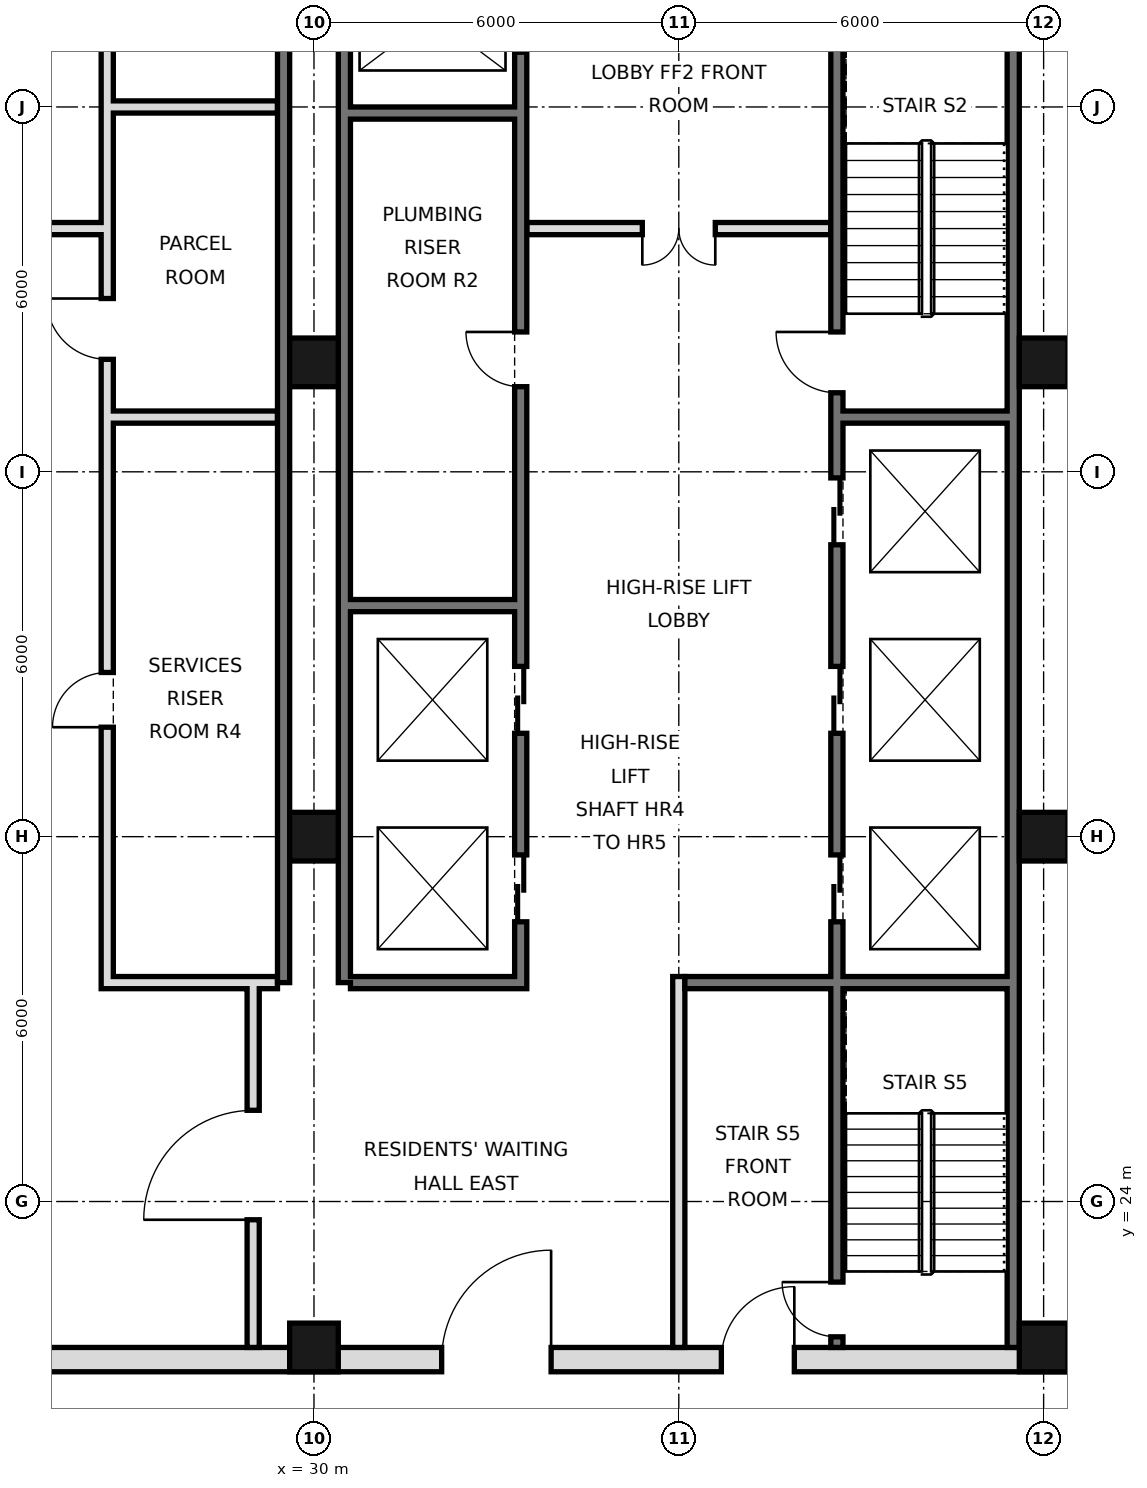
"""IFC4 building model, lengths in metres.
Left out: names, types, materials, properties, quantities, classifications, styles, units other than length and angle.
Written with IfcOpenShell. Run it as: python <this file> out.ifc"""

import sys

from ifc_helpers import new_model, si_unit, direction, frame, frame_2d, origin, origin_2d, place, context, subcontext, project, spatial, rectangle, hollow_rectangle, extrude, element, fill, save


model = new_model("IFC4")
c1 = context("Model", 3, precision=1e-05, world=origin(), true_north=direction((0.0, 1.0)))
c2 = subcontext(c1, "Body", "Model", "MODEL_VIEW")
j1 = project(units=[si_unit("LENGTHUNIT", "METRE"), si_unit("PLANEANGLEUNIT", "RADIAN")], contexts=[c1])
p1 = place(None, origin())
s1 = spatial("IfcSite", under=j1, at=p1, CompositionType="ELEMENT")
p2 = place(p1, origin())
s2 = spatial("IfcBuilding", under=s1, at=p2, CompositionType="ELEMENT")
p3 = place(p2, frame((0.0, 0.0, 239.6)))
s3 = spatial("IfcBuildingStorey", under=s2, at=p3, CompositionType="ELEMENT", Elevation=239.6)
for number, where, z_axis, x_axis in (
    (1, (30.0, 21.6, 0.0), (0.0, 0.0, 1.0), (1.0, 0.0, 0.0)),
    (2, (30.0, 30.0, 0.0), (0.0, 0.0, 1.0), (1.0, 0.0, 0.0)),
    (3, (30.0, 37.8, 0.0), (0.0, 0.0, 1.0), (1.0, 0.0, 0.0)),
    (4, (42.0, 21.6, 0.0), (0.0, 0.0, 1.0), (1.0, 0.0, 0.0)),
    (5, (42.0, 30.0, 0.0), (0.0, 0.0, 1.0), (1.0, 0.0, 0.0)),
    (6, (42.0, 37.8, 0.0), (0.0, 0.0, 1.0), (1.0, 0.0, 0.0)),
):
    element("IfcColumn", number, at=place(p3, frame(where, z_axis=z_axis, x_axis=x_axis)), inside=s3, PredefinedType="COLUMN", context=c2, shape_type="SweptSolid", body=[
        extrude(hollow_rectangle(XDim=0.8, YDim=0.8, WallThickness=0.04, at=origin_2d()), origin(), (0.0, 0.0, 1.0), 3.6),
    ])
p4 = place(p3, frame((41.5, 21.6, 0.0), z_axis=(0.0, 0.0, 1.0), x_axis=(0.0, 1.0, 0.0)))
e7 = element("IfcWall", 7, at=p4, inside=s3, PredefinedType="SOLIDWALL", context=c2, shape_type="SweptSolid", body=[
    extrude(rectangle(XDim=23.5, YDim=0.2, at=frame_2d((11.75, 0.0))), origin(), (0.0, 0.0, 1.0), 3.42),
])
for number, where, z_axis, x_axis in (
    (8, (29.5, 27.6, 0.0), (0.0, 0.0, 1.0), (0.0, 1.0, 0.0)),
    (9, (30.5, 27.6, 0.0), (0.0, 0.0, 1.0), (0.0, 1.0, 0.0)),
):
    element("IfcWall", number, at=place(p3, frame(where, z_axis=z_axis, x_axis=x_axis)), inside=s3, PredefinedType="SOLIDWALL", context=c2, shape_type="SweptSolid", body=[
        extrude(rectangle(XDim=17.5, YDim=0.2, at=frame_2d((8.75, 0.0))), origin(), (0.0, 0.0, 1.0), 3.42),
    ])
p5 = place(p3, frame((5.6, 21.4, 0.0), z_axis=(0.0, 0.0, 1.0), x_axis=(1.0, 0.0, 0.0)))
e10 = element("IfcWall", 10, at=p5, inside=s3, PredefinedType="SOLIDWALL", context=c2, shape_type="SweptSolid", body=[
    extrude(rectangle(XDim=36.8, YDim=0.4, at=frame_2d((18.4, 0.0))), origin(), (0.0, 0.0, 1.0), 3.42),
])
p6 = place(p5, frame((8.5, 0.0, 0.0)))
e11 = element("IfcOpeningElement", 11, at=p6, cuts=e10, PredefinedType="OPENING", context=c2, shape_type="SweptSolid", body=[
    extrude(rectangle(XDim=1.8, YDim=2.1, at=frame_2d((0.9, 1.05))), frame((0.0, 0.21, 0.0), z_axis=(0.0, -1.0, 0.0), x_axis=(1.0, 0.0, 0.0)), (0.0, 0.0, 1.0), 0.42),
])
p7 = place(p5, frame((17.5, 0.0, 0.0)))
e12 = element("IfcOpeningElement", 12, at=p7, cuts=e10, PredefinedType="OPENING", context=c2, shape_type="SweptSolid", body=[
    extrude(rectangle(XDim=1.8, YDim=2.1, at=frame_2d((0.9, 1.05))), frame((0.0, 0.21, 0.0), z_axis=(0.0, -1.0, 0.0), x_axis=(1.0, 0.0, 0.0)), (0.0, 0.0, 1.0), 0.42),
])
p8 = place(p5, frame((26.5, 0.0, 0.0)))
e13 = element("IfcOpeningElement", 13, at=p8, cuts=e10, PredefinedType="OPENING", context=c2, shape_type="SweptSolid", body=[
    extrude(rectangle(XDim=1.8, YDim=2.1, at=frame_2d((0.9, 1.05))), frame((0.0, 0.21, 0.0), z_axis=(0.0, -1.0, 0.0), x_axis=(1.0, 0.0, 0.0)), (0.0, 0.0, 1.0), 0.42),
])
p9 = place(p5, frame((4.5, 0.0, 0.0)))
e14 = element("IfcOpeningElement", 14, at=p9, cuts=e10, PredefinedType="OPENING", context=c2, shape_type="SweptSolid", body=[
    extrude(rectangle(XDim=1.2, YDim=2.1, at=frame_2d((0.6, 1.05))), frame((0.0, 0.21, 0.0), z_axis=(0.0, -1.0, 0.0), x_axis=(1.0, 0.0, 0.0)), (0.0, 0.0, 1.0), 0.42),
])
p10 = place(p5, frame((31.1, 0.0, 0.0)))
e15 = element("IfcOpeningElement", 15, at=p10, cuts=e10, PredefinedType="OPENING", context=c2, shape_type="SweptSolid", body=[
    extrude(rectangle(XDim=1.2, YDim=2.1, at=frame_2d((0.6, 1.05))), frame((0.0, 0.21, 0.0), z_axis=(0.0, -1.0, 0.0), x_axis=(1.0, 0.0, 0.0)), (0.0, 0.0, 1.0), 0.42),
])
p11 = place(p3, frame((29.0, 21.6, 0.0), z_axis=(0.0, 0.0, 1.0), x_axis=(0.0, 1.0, 0.0)))
e16 = element("IfcWall", 16, at=p11, inside=s3, PredefinedType="PARTITIONING", context=c2, shape_type="SweptSolid", body=[
    extrude(rectangle(XDim=6.0, YDim=0.2, at=frame_2d((3.0, 0.0))), origin(), (0.0, 0.0, 1.0), 3.42),
])
p12 = place(p11, frame((2.1, 0.0, 0.0)))
e17 = element("IfcOpeningElement", 17, at=p12, cuts=e16, PredefinedType="OPENING", context=c2, shape_type="SweptSolid", body=[
    extrude(rectangle(XDim=1.8, YDim=2.1, at=frame_2d((0.9, 1.05))), frame((0.0, 0.11, 0.0), z_axis=(0.0, -1.0, 0.0), x_axis=(1.0, 0.0, 0.0)), (0.0, 0.0, 1.0), 0.22),
])
p13 = place(p3, frame((26.6, 27.5, 0.0), z_axis=(0.0, 0.0, 1.0), x_axis=(0.0, 1.0, 0.0)))
e18 = element("IfcWall", 18, at=p13, inside=s3, PredefinedType="SOLIDWALL", context=c2, shape_type="SweptSolid", body=[
    extrude(rectangle(XDim=17.5, YDim=0.2, at=frame_2d((8.75, 0.0))), origin(), (0.0, 0.0, 1.0), 3.42),
])
p14 = place(p13, frame((4.3, 0.0, 0.0)))
e19 = element("IfcOpeningElement", 19, at=p14, cuts=e18, PredefinedType="OPENING", context=c2, shape_type="SweptSolid", body=[
    extrude(rectangle(XDim=0.9, YDim=2.1, at=frame_2d((0.45, 1.05))), frame((0.0, 0.11, 0.0), z_axis=(0.0, -1.0, 0.0), x_axis=(1.0, 0.0, 0.0)), (0.0, 0.0, 1.0), 0.22),
])
p15 = place(p13, frame((10.35, 0.0, 0.0)))
e20 = element("IfcOpeningElement", 20, at=p15, cuts=e18, PredefinedType="OPENING", context=c2, shape_type="SweptSolid", body=[
    extrude(rectangle(XDim=1.0, YDim=2.1, at=frame_2d((0.5, 1.05))), frame((0.0, 0.11, 0.0), z_axis=(0.0, -1.0, 0.0), x_axis=(1.0, 0.0, 0.0)), (0.0, 0.0, 1.0), 0.22),
])
p16 = place(p13, frame((15.475, 0.0, 0.0)))
e21 = element("IfcOpeningElement", 21, at=p16, cuts=e18, PredefinedType="OPENING", context=c2, shape_type="SweptSolid", body=[
    extrude(rectangle(XDim=1.0, YDim=2.1, at=frame_2d((0.5, 1.05))), frame((0.0, 0.11, 0.0), z_axis=(0.0, -1.0, 0.0), x_axis=(1.0, 0.0, 0.0)), (0.0, 0.0, 1.0), 0.22),
])
p17 = place(p3, frame((33.4, 27.5, 0.0), z_axis=(0.0, 0.0, 1.0), x_axis=(0.0, 1.0, 0.0)))
e22 = element("IfcWall", 22, at=p17, inside=s3, PredefinedType="SOLIDWALL", context=c2, shape_type="SweptSolid", body=[
    extrude(rectangle(XDim=17.5, YDim=0.2, at=frame_2d((8.75, 0.0))), origin(), (0.0, 0.0, 1.0), 3.42),
])
p18 = place(p17, frame((1.1, 0.0, 0.0)))
e23 = element("IfcOpeningElement", 23, at=p18, cuts=e22, PredefinedType="OPENING", context=c2, shape_type="SweptSolid", body=[
    extrude(rectangle(XDim=1.1, YDim=2.1, at=frame_2d((0.55, 1.05))), frame((0.0, 0.11, 0.0), z_axis=(0.0, -1.0, 0.0), x_axis=(1.0, 0.0, 0.0)), (0.0, 0.0, 1.0), 0.22),
])
p19 = place(p17, frame((4.2, 0.0, 0.0)))
e24 = element("IfcOpeningElement", 24, at=p19, cuts=e22, PredefinedType="OPENING", context=c2, shape_type="SweptSolid", body=[
    extrude(rectangle(XDim=1.1, YDim=2.1, at=frame_2d((0.55, 1.05))), frame((0.0, 0.11, 0.0), z_axis=(0.0, -1.0, 0.0), x_axis=(1.0, 0.0, 0.0)), (0.0, 0.0, 1.0), 0.22),
])
p20 = place(p17, frame((15.4, 0.0, 0.0)))
e25 = element("IfcOpeningElement", 25, at=p20, cuts=e22, PredefinedType="OPENING", context=c2, shape_type="SweptSolid", body=[
    extrude(rectangle(XDim=1.1, YDim=2.1, at=frame_2d((0.55, 1.05))), frame((0.0, 0.11, 0.0), z_axis=(0.0, -1.0, 0.0), x_axis=(1.0, 0.0, 0.0)), (0.0, 0.0, 1.0), 0.22),
])
p21 = place(p17, frame((9.9, 0.0, 0.0)))
e26 = element("IfcOpeningElement", 26, at=p21, cuts=e22, PredefinedType="OPENING", context=c2, shape_type="SweptSolid", body=[
    extrude(rectangle(XDim=0.9, YDim=2.1, at=frame_2d((0.45, 1.05))), frame((0.0, 0.11, 0.0), z_axis=(0.0, -1.0, 0.0), x_axis=(1.0, 0.0, 0.0)), (0.0, 0.0, 1.0), 0.22),
])
p22 = place(p3, frame((36.0, 21.6, 0.0), z_axis=(0.0, 0.0, 1.0), x_axis=(0.0, 1.0, 0.0)))
e27 = element("IfcWall", 27, at=p22, inside=s3, PredefinedType="PARTITIONING", context=c2, shape_type="SweptSolid", body=[
    extrude(rectangle(XDim=6.1, YDim=0.2, at=frame_2d((3.05, 0.0))), origin(), (0.0, 0.0, 1.0), 3.42),
])
p23 = place(p3, frame((38.6, 21.6, 0.0), z_axis=(0.0, 0.0, 1.0), x_axis=(0.0, 1.0, 0.0)))
e28 = element("IfcWall", 28, at=p23, inside=s3, PredefinedType="SOLIDWALL", context=c2, shape_type="SweptSolid", body=[
    extrude(rectangle(XDim=23.4, YDim=0.2, at=frame_2d((11.7, 0.0))), origin(), (0.0, 0.0, 1.0), 3.42),
])
p24 = place(p23, frame((7.0, 0.0, 0.0)))
e29 = element("IfcOpeningElement", 29, at=p24, cuts=e28, PredefinedType="OPENING", context=c2, shape_type="SweptSolid", body=[
    extrude(rectangle(XDim=1.1, YDim=2.1, at=frame_2d((0.55, 1.05))), frame((0.0, 0.11, 0.0), z_axis=(0.0, -1.0, 0.0), x_axis=(1.0, 0.0, 0.0)), (0.0, 0.0, 1.0), 0.22),
])
p25 = place(p23, frame((10.1, 0.0, 0.0)))
e30 = element("IfcOpeningElement", 30, at=p25, cuts=e28, PredefinedType="OPENING", context=c2, shape_type="SweptSolid", body=[
    extrude(rectangle(XDim=1.1, YDim=2.1, at=frame_2d((0.55, 1.05))), frame((0.0, 0.11, 0.0), z_axis=(0.0, -1.0, 0.0), x_axis=(1.0, 0.0, 0.0)), (0.0, 0.0, 1.0), 0.22),
])
p26 = place(p23, frame((13.2, 0.0, 0.0)))
e31 = element("IfcOpeningElement", 31, at=p26, cuts=e28, PredefinedType="OPENING", context=c2, shape_type="SweptSolid", body=[
    extrude(rectangle(XDim=1.1, YDim=2.1, at=frame_2d((0.55, 1.05))), frame((0.0, 0.11, 0.0), z_axis=(0.0, -1.0, 0.0), x_axis=(1.0, 0.0, 0.0)), (0.0, 0.0, 1.0), 0.22),
])
p27 = place(p23, frame((15.7, 0.0, 0.0)))
e32 = element("IfcOpeningElement", 32, at=p27, cuts=e28, PredefinedType="OPENING", context=c2, shape_type="SweptSolid", body=[
    extrude(rectangle(XDim=1.0, YDim=2.1, at=frame_2d((0.5, 1.05))), frame((0.0, 0.11, 0.0), z_axis=(0.0, -1.0, 0.0), x_axis=(1.0, 0.0, 0.0)), (0.0, 0.0, 1.0), 0.22),
])
p28 = place(p23, frame((0.175, 0.0, 0.0)))
e33 = element("IfcOpeningElement", 33, at=p28, cuts=e28, PredefinedType="OPENING", context=c2, shape_type="SweptSolid", body=[
    extrude(rectangle(XDim=0.9, YDim=2.1, at=frame_2d((0.45, 1.05))), frame((0.0, 0.11, 0.0), z_axis=(0.0, -1.0, 0.0), x_axis=(1.0, 0.0, 0.0)), (0.0, 0.0, 1.0), 0.22),
])
for number, where, z_axis, x_axis in (
    (34, (26.7, 27.6, 0.0), (0.0, 0.0, 1.0), (1.0, 0.0, 0.0)),
    (35, (30.6, 27.6, 0.0), (0.0, 0.0, 1.0), (1.0, 0.0, 0.0)),
):
    element("IfcWall", number, at=place(p3, frame(where, z_axis=z_axis, x_axis=x_axis)), inside=s3, PredefinedType="SOLIDWALL", context=c2, shape_type="SweptSolid", body=[
        extrude(rectangle(XDim=2.7, YDim=0.2, at=frame_2d((1.35, 0.0))), origin(), (0.0, 0.0, 1.0), 3.42),
    ])
p29 = place(p3, frame((36.1, 27.6, 0.0), z_axis=(0.0, 0.0, 1.0), x_axis=(1.0, 0.0, 0.0)))
e36 = element("IfcWall", 36, at=p29, inside=s3, PredefinedType="SOLIDWALL", context=c2, shape_type="SweptSolid", body=[
    extrude(rectangle(XDim=5.3, YDim=0.2, at=frame_2d((2.65, 0.0))), origin(), (0.0, 0.0, 1.0), 3.42),
])
for number, where, z_axis, x_axis in (
    (37, (30.6, 33.8, 0.0), (0.0, 0.0, 1.0), (1.0, 0.0, 0.0)),
    (38, (26.7, 36.9, 0.0), (0.0, 0.0, 1.0), (1.0, 0.0, 0.0)),
    (39, (38.7, 36.9, 0.0), (0.0, 0.0, 1.0), (1.0, 0.0, 0.0)),
):
    element("IfcWall", number, at=place(p3, frame(where, z_axis=z_axis, x_axis=x_axis)), inside=s3, PredefinedType="SOLIDWALL", context=c2, shape_type="SweptSolid", body=[
        extrude(rectangle(XDim=2.7, YDim=0.2, at=frame_2d((1.35, 0.0))), origin(), (0.0, 0.0, 1.0), 3.42),
    ])
p30 = place(p3, frame((21.5, 40.0, 0.0), z_axis=(0.0, 0.0, 1.0), x_axis=(1.0, 0.0, 0.0)))
e40 = element("IfcWall", 40, at=p30, inside=s3, PredefinedType="PARTITIONING", context=c2, shape_type="SweptSolid", body=[
    extrude(rectangle(XDim=5.0, YDim=0.2, at=frame_2d((2.5, 0.0))), origin(), (0.0, 0.0, 1.0), 3.42),
])
p31 = place(p30, frame((1.9, 0.0, 0.0)))
e41 = element("IfcOpeningElement", 41, at=p31, cuts=e40, PredefinedType="OPENING", context=c2, shape_type="SweptSolid", body=[
    extrude(rectangle(XDim=1.2, YDim=2.1, at=frame_2d((0.6, 1.05))), frame((0.0, 0.11, 0.0), z_axis=(0.0, -1.0, 0.0), x_axis=(1.0, 0.0, 0.0)), (0.0, 0.0, 1.0), 0.22),
])
p32 = place(p3, frame((33.5, 40.0, 0.0), z_axis=(0.0, 0.0, 1.0), x_axis=(1.0, 0.0, 0.0)))
e42 = element("IfcWall", 42, at=p32, inside=s3, PredefinedType="PARTITIONING", context=c2, shape_type="SweptSolid", body=[
    extrude(rectangle(XDim=5.0, YDim=0.2, at=frame_2d((2.5, 0.0))), origin(), (0.0, 0.0, 1.0), 3.42),
])
p33 = place(p32, frame((1.9, 0.0, 0.0)))
e43 = element("IfcOpeningElement", 43, at=p33, cuts=e42, PredefinedType="OPENING", context=c2, shape_type="SweptSolid", body=[
    extrude(rectangle(XDim=1.2, YDim=2.1, at=frame_2d((0.6, 1.05))), frame((0.0, 0.11, 0.0), z_axis=(0.0, -1.0, 0.0), x_axis=(1.0, 0.0, 0.0)), (0.0, 0.0, 1.0), 0.22),
])
p34 = place(p3, frame((30.6, 41.9, 0.0), z_axis=(0.0, 0.0, 1.0), x_axis=(1.0, 0.0, 0.0)))
e44 = element("IfcWall", 44, at=p34, inside=s3, PredefinedType="SOLIDWALL", context=c2, shape_type="SweptSolid", body=[
    extrude(rectangle(XDim=2.7, YDim=0.2, at=frame_2d((1.35, 0.0))), origin(), (0.0, 0.0, 1.0), 3.42),
])
p35 = place(p3, frame((26.7, 42.0, 0.0), z_axis=(0.0, 0.0, 1.0), x_axis=(1.0, 0.0, 0.0)))
e45 = element("IfcWall", 45, at=p35, inside=s3, PredefinedType="PARTITIONING", context=c2, shape_type="SweptSolid", body=[
    extrude(rectangle(XDim=2.7, YDim=0.2, at=frame_2d((1.35, 0.0))), origin(), (0.0, 0.0, 1.0), 3.42),
])
p36 = place(p12, origin())
e46 = element("IfcDoor", 46, at=p36, inside=s3, OperationType="SINGLE_SWING_LEFT", PredefinedType="DOOR", context=c2, shape_type="SweptSolid", body=[
    extrude(rectangle(XDim=1.8, YDim=2.1, at=frame_2d((0.9, 1.05))), frame((0.0, 0.025, 0.0), z_axis=(0.0, -1.0, 0.0), x_axis=(1.0, 0.0, 0.0)), (0.0, 0.0, 1.0), 0.05),
])
fill(e17, e46)
p37 = place(p8, frame((1.8, 0.0, 0.0), z_axis=(0.0, 0.0, 1.0), x_axis=(-1.0, 0.0, 0.0)))
e47 = element("IfcDoor", 47, at=p37, inside=s3, OperationType="SINGLE_SWING_LEFT", PredefinedType="DOOR", context=c2, shape_type="SweptSolid", body=[
    extrude(rectangle(XDim=1.8, YDim=2.1, at=frame_2d((0.9, 1.05))), frame((0.0, 0.025, 0.0), z_axis=(0.0, -1.0, 0.0), x_axis=(1.0, 0.0, 0.0)), (0.0, 0.0, 1.0), 0.05),
])
fill(e13, e47)
p38 = place(p10, frame((1.2, 0.0, 0.0), z_axis=(0.0, 0.0, 1.0), x_axis=(-1.0, 0.0, 0.0)))
e48 = element("IfcDoor", 48, at=p38, inside=s3, OperationType="SINGLE_SWING_LEFT", PredefinedType="DOOR", context=c2, shape_type="SweptSolid", body=[
    extrude(rectangle(XDim=1.2, YDim=2.1, at=frame_2d((0.6, 1.05))), frame((0.0, 0.025, 0.0), z_axis=(0.0, -1.0, 0.0), x_axis=(1.0, 0.0, 0.0)), (0.0, 0.0, 1.0), 0.05),
])
fill(e15, e48)
p39 = place(p33, frame((1.2, 0.0, 0.0), z_axis=(0.0, 0.0, 1.0), x_axis=(-1.0, 0.0, 0.0)))
e49 = element("IfcDoor", 49, at=p39, inside=s3, OperationType="DOUBLE_DOOR_SINGLE_SWING", PredefinedType="DOOR", context=c2, shape_type="SweptSolid", body=[
    extrude(rectangle(XDim=1.2, YDim=2.1, at=frame_2d((0.6, 1.05))), frame((0.0, 0.025, 0.0), z_axis=(0.0, -1.0, 0.0), x_axis=(1.0, 0.0, 0.0)), (0.0, 0.0, 1.0), 0.05),
])
fill(e43, e49)
p40 = place(p24, origin())
e50 = element("IfcDoor", 50, at=p40, inside=s3, OperationType="DOUBLE_DOOR_SLIDING", PredefinedType="DOOR", context=c2, shape_type="SweptSolid", body=[
    extrude(rectangle(XDim=1.1, YDim=2.1, at=frame_2d((0.55, 1.05))), frame((0.0, 0.025, 0.0), z_axis=(0.0, -1.0, 0.0), x_axis=(1.0, 0.0, 0.0)), (0.0, 0.0, 1.0), 0.05),
])
fill(e29, e50)
p41 = place(p25, origin())
e51 = element("IfcDoor", 51, at=p41, inside=s3, OperationType="DOUBLE_DOOR_SLIDING", PredefinedType="DOOR", context=c2, shape_type="SweptSolid", body=[
    extrude(rectangle(XDim=1.1, YDim=2.1, at=frame_2d((0.55, 1.05))), frame((0.0, 0.025, 0.0), z_axis=(0.0, -1.0, 0.0), x_axis=(1.0, 0.0, 0.0)), (0.0, 0.0, 1.0), 0.05),
])
fill(e30, e51)
p42 = place(p26, origin())
e52 = element("IfcDoor", 52, at=p42, inside=s3, OperationType="DOUBLE_DOOR_SLIDING", PredefinedType="DOOR", context=c2, shape_type="SweptSolid", body=[
    extrude(rectangle(XDim=1.1, YDim=2.1, at=frame_2d((0.55, 1.05))), frame((0.0, 0.025, 0.0), z_axis=(0.0, -1.0, 0.0), x_axis=(1.0, 0.0, 0.0)), (0.0, 0.0, 1.0), 0.05),
])
fill(e31, e52)
p43 = place(p18, origin())
e53 = element("IfcDoor", 53, at=p43, inside=s3, OperationType="DOUBLE_DOOR_SLIDING", PredefinedType="DOOR", context=c2, shape_type="SweptSolid", body=[
    extrude(rectangle(XDim=1.1, YDim=2.1, at=frame_2d((0.55, 1.05))), frame((0.0, 0.025, 0.0), z_axis=(0.0, -1.0, 0.0), x_axis=(1.0, 0.0, 0.0)), (0.0, 0.0, 1.0), 0.05),
])
fill(e23, e53)
p44 = place(p19, origin())
e54 = element("IfcDoor", 54, at=p44, inside=s3, OperationType="DOUBLE_DOOR_SLIDING", PredefinedType="DOOR", context=c2, shape_type="SweptSolid", body=[
    extrude(rectangle(XDim=1.1, YDim=2.1, at=frame_2d((0.55, 1.05))), frame((0.0, 0.025, 0.0), z_axis=(0.0, -1.0, 0.0), x_axis=(1.0, 0.0, 0.0)), (0.0, 0.0, 1.0), 0.05),
])
fill(e24, e54)
p45 = place(p27, frame((1.0, 0.0, 0.0), z_axis=(0.0, 0.0, 1.0), x_axis=(-1.0, 0.0, 0.0)))
e55 = element("IfcDoor", 55, at=p45, inside=s3, OperationType="SINGLE_SWING_LEFT", PredefinedType="DOOR", context=c2, shape_type="SweptSolid", body=[
    extrude(rectangle(XDim=1.0, YDim=2.1, at=frame_2d((0.5, 1.05))), frame((0.0, 0.025, 0.0), z_axis=(0.0, -1.0, 0.0), x_axis=(1.0, 0.0, 0.0)), (0.0, 0.0, 1.0), 0.05),
])
fill(e32, e55)
p46 = place(p28, frame((0.9, 0.0, 0.0), z_axis=(0.0, 0.0, 1.0), x_axis=(-1.0, 0.0, 0.0)))
e56 = element("IfcDoor", 56, at=p46, inside=s3, OperationType="SINGLE_SWING_LEFT", PredefinedType="DOOR", context=c2, shape_type="SweptSolid", body=[
    extrude(rectangle(XDim=0.9, YDim=2.1, at=frame_2d((0.45, 1.05))), frame((0.0, 0.025, 0.0), z_axis=(0.0, -1.0, 0.0), x_axis=(1.0, 0.0, 0.0)), (0.0, 0.0, 1.0), 0.05),
])
fill(e33, e56)
p47 = place(p21, frame((0.9, 0.0, 0.0), z_axis=(0.0, 0.0, 1.0), x_axis=(-1.0, 0.0, 0.0)))
e57 = element("IfcDoor", 57, at=p47, inside=s3, OperationType="SINGLE_SWING_LEFT", PredefinedType="DOOR", context=c2, shape_type="SweptSolid", body=[
    extrude(rectangle(XDim=0.9, YDim=2.1, at=frame_2d((0.45, 1.05))), frame((0.0, 0.025, 0.0), z_axis=(0.0, -1.0, 0.0), x_axis=(1.0, 0.0, 0.0)), (0.0, 0.0, 1.0), 0.05),
])
fill(e26, e57)
p48 = place(p14, origin())
e58 = element("IfcDoor", 58, at=p48, inside=s3, OperationType="SINGLE_SWING_LEFT", PredefinedType="DOOR", context=c2, shape_type="SweptSolid", body=[
    extrude(rectangle(XDim=0.9, YDim=2.1, at=frame_2d((0.45, 1.05))), frame((0.0, 0.025, 0.0), z_axis=(0.0, -1.0, 0.0), x_axis=(1.0, 0.0, 0.0)), (0.0, 0.0, 1.0), 0.05),
])
fill(e19, e58)
p49 = place(p15, frame((1.0, 0.0, 0.0), z_axis=(0.0, 0.0, 1.0), x_axis=(-1.0, 0.0, 0.0)))
e59 = element("IfcDoor", 59, at=p49, inside=s3, OperationType="SINGLE_SWING_LEFT", PredefinedType="DOOR", context=c2, shape_type="SweptSolid", body=[
    extrude(rectangle(XDim=1.0, YDim=2.1, at=frame_2d((0.5, 1.05))), frame((0.0, 0.025, 0.0), z_axis=(0.0, -1.0, 0.0), x_axis=(1.0, 0.0, 0.0)), (0.0, 0.0, 1.0), 0.05),
])
fill(e20, e59)
save(model, sys.argv[1])
